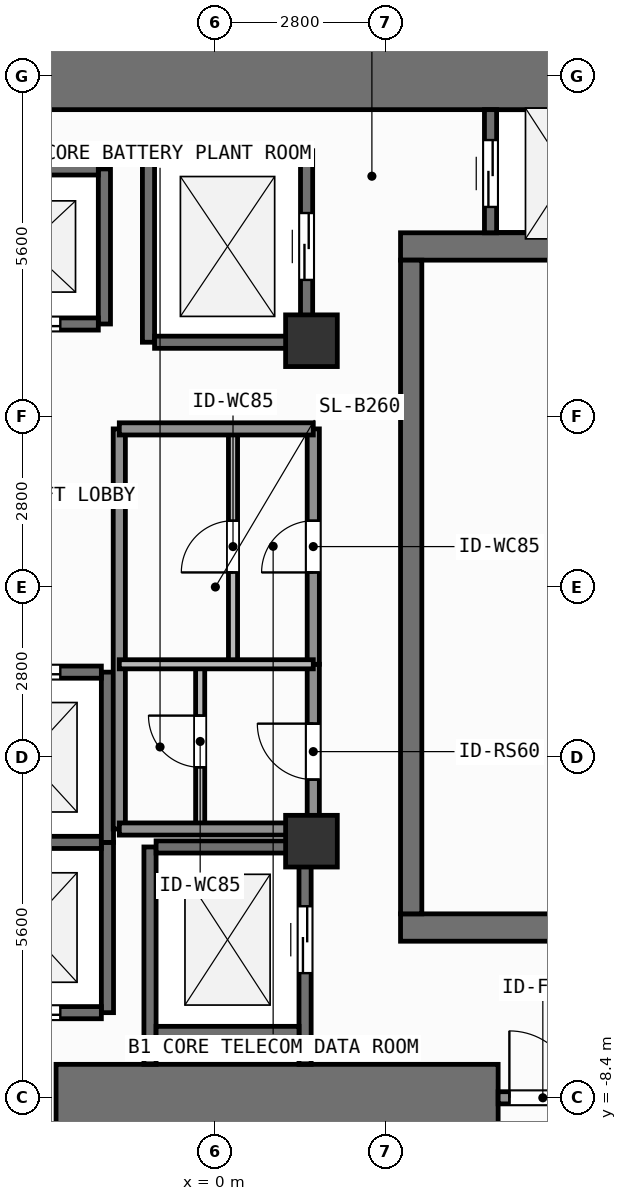
"""IFC4 building model, lengths in metres.
Left out: names, types, materials, properties, quantities, classifications, styles, units other than length and angle.
Written with IfcOpenShell. Run it as: python <this file> out.ifc"""

import sys

from ifc_helpers import new_model, si_unit, direction, frame, frame_2d, origin, origin_2d, place, context, subcontext, project, spatial, rectangle, extrude, element, fill, save


model = new_model("IFC4")
c1 = context("Model", 3, precision=1e-05, world=origin(), true_north=direction((0.0, 1.0)))
c2 = subcontext(c1, "Body", "Model", "MODEL_VIEW")
j1 = project(units=[si_unit("LENGTHUNIT", "METRE"), si_unit("PLANEANGLEUNIT", "RADIAN")], contexts=[c1])
p1 = place(None, origin())
s1 = spatial("IfcSite", under=j1, at=p1, CompositionType="ELEMENT")
p2 = place(p1, origin())
s2 = spatial("IfcBuilding", under=s1, at=p2, CompositionType="ELEMENT")
p3 = place(p2, frame((0.0, 0.0, -4.2)))
s3 = spatial("IfcBuildingStorey", under=s2, at=p3, CompositionType="ELEMENT", Elevation=-4.2)
p4 = place(p3, frame((-2.62, -8.4, 0.0), z_axis=(0.0, 0.0, 1.0), x_axis=(1.0, 0.0, 0.0)))
e1 = element("IfcWall", 1, at=p4, inside=s3, PredefinedType="SHEAR", context=c2, shape_type="SweptSolid", body=[
    extrude(rectangle(XDim=7.27, YDim=1.1, at=frame_2d((3.635, 0.0))), origin(), (0.0, 0.0, 1.0), 4.2),
])
p5 = place(p3, frame((-7.55, 8.4, 0.0), z_axis=(0.0, 0.0, 1.0), x_axis=(1.0, 0.0, 0.0)))
e2 = element("IfcWall", 2, at=p5, inside=s3, PredefinedType="SHEAR", context=c2, shape_type="SweptSolid", body=[
    extrude(rectangle(XDim=16.5, YDim=1.1, at=frame_2d((8.25, 0.0))), origin(), (0.0, 0.0, 1.0), 4.2),
])
for number, where, z_axis, x_axis in (
    (3, (3.045, -5.6, 0.0), (0.0, 0.0, 1.0), (1.0, 0.0, 0.0)),
    (4, (3.045, 5.6, 0.0), (0.0, 0.0, 1.0), (1.0, 0.0, 0.0)),
):
    element("IfcWall", number, at=place(p3, frame(where, z_axis=z_axis, x_axis=x_axis)), inside=s3, PredefinedType="SHEAR", context=c2, shape_type="SweptSolid", body=[
        extrude(rectangle(XDim=5.905, YDim=0.45, at=frame_2d((2.953, 0.0))), origin(), (0.0, 0.0, 1.0), 4.2),
    ])
p6 = place(p3, frame((3.22, -5.375, 0.0), z_axis=(0.0, 0.0, 1.0), x_axis=(0.0, 1.0, 0.0)))
e5 = element("IfcWall", 5, at=p6, inside=s3, PredefinedType="SHEAR", context=c2, shape_type="SweptSolid", body=[
    extrude(rectangle(XDim=10.75, YDim=0.35, at=frame_2d((5.375, 0.0))), origin(), (0.0, 0.0, 1.0), 4.2),
])
for number, where, z_axis, x_axis in (
    (6, (1.58, -4.18, 0.0), (0.0, 0.0, 1.0), (1.0, 0.0, 0.0)),
    (7, (1.58, 4.05, 0.0), (0.0, 0.0, 1.0), (1.0, 0.0, 0.0)),
):
    element("IfcColumn", number, at=place(p3, frame(where, z_axis=z_axis, x_axis=x_axis)), inside=s3, PredefinedType="COLUMN", context=c2, shape_type="SweptSolid", body=[
        extrude(rectangle(XDim=0.85, YDim=0.85, at=origin_2d()), origin(), (0.0, 0.0, 1.0), 4.2),
    ])
p7 = place(p3, frame((-1.825, 4.325, 0.0), z_axis=(0.0, 0.0, 1.0), x_axis=(0.0, 1.0, 0.0)))
e8 = element("IfcWall", 8, at=p7, inside=s3, PredefinedType="SHEAR", context=c2, shape_type="SweptSolid", body=[
    extrude(rectangle(XDim=2.55, YDim=0.2, at=frame_2d((1.275, 0.0))), origin(), (0.0, 0.0, 1.0), 3.9),
])
p8 = place(p3, frame((-4.275, 4.325, 0.0), z_axis=(0.0, 0.0, 1.0), x_axis=(1.0, 0.0, 0.0)))
e9 = element("IfcWall", 9, at=p8, inside=s3, PredefinedType="SHEAR", context=c2, shape_type="SweptSolid", body=[
    extrude(rectangle(XDim=2.35, YDim=0.2, at=frame_2d((1.175, 0.0))), origin(), (0.0, 0.0, 1.0), 3.9),
])
p9 = place(p8, frame((0.625, 0.0, 0.0)))
e10 = element("IfcOpeningElement", 10, at=p9, cuts=e9, PredefinedType="OPENING", context=c2, shape_type="SweptSolid", body=[
    extrude(rectangle(XDim=1.1, YDim=2.2, at=frame_2d((0.55, 1.1))), frame((0.0, 0.11, 0.0), z_axis=(0.0, -1.0, 0.0), x_axis=(1.0, 0.0, 0.0)), (0.0, 0.0, 1.0), 0.22),
])
p10 = place(p3, frame((-4.275, 6.875, 0.0), z_axis=(0.0, 0.0, 1.0), x_axis=(1.0, 0.0, 0.0)))
e11 = element("IfcWall", 11, at=p10, inside=s3, PredefinedType="SHEAR", context=c2, shape_type="SweptSolid", body=[
    extrude(rectangle(XDim=2.35, YDim=0.2, at=frame_2d((1.175, 0.0))), origin(), (0.0, 0.0, 1.0), 3.9),
])
p11 = place(p3, frame((-1.775, -7.0, 0.0), z_axis=(0.0, 0.0, 1.0), x_axis=(0.0, 1.0, 0.0)))
e12 = element("IfcWall", 12, at=p11, inside=s3, PredefinedType="SHEAR", context=c2, shape_type="SweptSolid", body=[
    extrude(rectangle(XDim=2.8, YDim=0.2, at=frame_2d((1.4, 0.0))), origin(), (0.0, 0.0, 1.0), 3.9),
])
p12 = place(p3, frame((-4.325, -7.0, 0.0), z_axis=(0.0, 0.0, 1.0), x_axis=(1.0, 0.0, 0.0)))
e13 = element("IfcWall", 13, at=p12, inside=s3, PredefinedType="SHEAR", context=c2, shape_type="SweptSolid", body=[
    extrude(rectangle(XDim=2.45, YDim=0.2, at=frame_2d((1.225, 0.0))), origin(), (0.0, 0.0, 1.0), 3.9),
])
p13 = place(p12, frame((0.675, 0.0, 0.0)))
e14 = element("IfcOpeningElement", 14, at=p13, cuts=e13, PredefinedType="OPENING", context=c2, shape_type="SweptSolid", body=[
    extrude(rectangle(XDim=1.1, YDim=2.2, at=frame_2d((0.55, 1.1))), frame((0.0, 0.11, 0.0), z_axis=(0.0, -1.0, 0.0), x_axis=(1.0, 0.0, 0.0)), (0.0, 0.0, 1.0), 0.22),
])
p14 = place(p3, frame((-4.325, -4.2, 0.0), z_axis=(0.0, 0.0, 1.0), x_axis=(1.0, 0.0, 0.0)))
e15 = element("IfcWall", 15, at=p14, inside=s3, PredefinedType="SHEAR", context=c2, shape_type="SweptSolid", body=[
    extrude(rectangle(XDim=2.45, YDim=0.2, at=frame_2d((1.225, 0.0))), origin(), (0.0, 0.0, 1.0), 3.9),
])
p15 = place(p3, frame((-1.775, -4.2, 0.0), z_axis=(0.0, 0.0, 1.0), x_axis=(0.0, 1.0, 0.0)))
e16 = element("IfcWall", 16, at=p15, inside=s3, PredefinedType="SHEAR", context=c2, shape_type="SweptSolid", body=[
    extrude(rectangle(XDim=2.8, YDim=0.2, at=frame_2d((1.4, 0.0))), origin(), (0.0, 0.0, 1.0), 3.9),
])
p16 = place(p3, frame((-4.325, -1.4, 0.0), z_axis=(0.0, 0.0, 1.0), x_axis=(1.0, 0.0, 0.0)))
e17 = element("IfcWall", 17, at=p16, inside=s3, PredefinedType="SHEAR", context=c2, shape_type="SweptSolid", body=[
    extrude(rectangle(XDim=2.45, YDim=0.2, at=frame_2d((1.225, 0.0))), origin(), (0.0, 0.0, 1.0), 3.9),
])
p17 = place(p16, frame((0.675, 0.0, 0.0)))
e18 = element("IfcOpeningElement", 18, at=p17, cuts=e17, PredefinedType="OPENING", context=c2, shape_type="SweptSolid", body=[
    extrude(rectangle(XDim=1.1, YDim=2.2, at=frame_2d((0.55, 1.1))), frame((0.0, 0.11, 0.0), z_axis=(0.0, -1.0, 0.0), x_axis=(1.0, 0.0, 0.0)), (0.0, 0.0, 1.0), 0.22),
])
p18 = place(p3, frame((-1.1, 4.025, 0.0), z_axis=(0.0, 0.0, 1.0), x_axis=(0.0, 1.0, 0.0)))
e19 = element("IfcWall", 19, at=p18, inside=s3, PredefinedType="SHEAR", context=c2, shape_type="SweptSolid", body=[
    extrude(rectangle(XDim=3.15, YDim=0.2, at=frame_2d((1.575, 0.0))), origin(), (0.0, 0.0, 1.0), 3.9),
])
p19 = place(p3, frame((1.5, 4.025, 0.0), z_axis=(0.0, 0.0, 1.0), x_axis=(0.0, 1.0, 0.0)))
e20 = element("IfcWall", 20, at=p19, inside=s3, PredefinedType="SHEAR", context=c2, shape_type="SweptSolid", body=[
    extrude(rectangle(XDim=3.15, YDim=0.2, at=frame_2d((1.575, 0.0))), origin(), (0.0, 0.0, 1.0), 3.9),
])
p20 = place(p19, frame((1.025, 0.0, 0.0)))
e21 = element("IfcOpeningElement", 21, at=p20, cuts=e20, PredefinedType="OPENING", context=c2, shape_type="SweptSolid", body=[
    extrude(rectangle(XDim=1.1, YDim=2.2, at=frame_2d((0.55, 1.1))), frame((0.0, 0.11, 0.0), z_axis=(0.0, -1.0, 0.0), x_axis=(1.0, 0.0, 0.0)), (0.0, 0.0, 1.0), 0.22),
])
for number, where, z_axis, x_axis in (
    (22, (-1.0, 4.025, 0.0), (0.0, 0.0, 1.0), (1.0, 0.0, 0.0)),
    (23, (-1.0, 7.175, 0.0), (0.0, 0.0, 1.0), (1.0, 0.0, 0.0)),
):
    element("IfcWall", number, at=place(p3, frame(where, z_axis=z_axis, x_axis=x_axis)), inside=s3, PredefinedType="SHEAR", context=c2, shape_type="SweptSolid", body=[
        extrude(rectangle(XDim=2.4, YDim=0.2, at=frame_2d((1.2, 0.0))), origin(), (0.0, 0.0, 1.0), 3.9),
    ])
p21 = place(p3, frame((-1.075, -7.85, 0.0), z_axis=(0.0, 0.0, 1.0), x_axis=(0.0, 1.0, 0.0)))
e24 = element("IfcWall", 24, at=p21, inside=s3, PredefinedType="SHEAR", context=c2, shape_type="SweptSolid", body=[
    extrude(rectangle(XDim=3.575, YDim=0.2, at=frame_2d((1.788, 0.0))), origin(), (0.0, 0.0, 1.0), 3.9),
])
p22 = place(p3, frame((1.475, -7.85, 0.0), z_axis=(0.0, 0.0, 1.0), x_axis=(0.0, 1.0, 0.0)))
e25 = element("IfcWall", 25, at=p22, inside=s3, PredefinedType="SHEAR", context=c2, shape_type="SweptSolid", body=[
    extrude(rectangle(XDim=3.575, YDim=0.2, at=frame_2d((1.788, 0.0))), origin(), (0.0, 0.0, 1.0), 3.9),
])
p23 = place(p22, frame((1.5, 0.0, 0.0)))
e26 = element("IfcOpeningElement", 26, at=p23, cuts=e25, PredefinedType="OPENING", context=c2, shape_type="SweptSolid", body=[
    extrude(rectangle(XDim=1.1, YDim=2.2, at=frame_2d((0.55, 1.1))), frame((0.0, 0.11, 0.0), z_axis=(0.0, -1.0, 0.0), x_axis=(1.0, 0.0, 0.0)), (0.0, 0.0, 1.0), 0.22),
])
for number, where, z_axis, x_axis in (
    (27, (-0.975, -7.325, 0.0), (0.0, 0.0, 1.0), (1.0, 0.0, 0.0)),
    (28, (-0.975, -4.275, 0.0), (0.0, 0.0, 1.0), (1.0, 0.0, 0.0)),
):
    element("IfcWall", number, at=place(p3, frame(where, z_axis=z_axis, x_axis=x_axis)), inside=s3, PredefinedType="SHEAR", context=c2, shape_type="SweptSolid", body=[
        extrude(rectangle(XDim=2.35, YDim=0.2, at=frame_2d((1.175, 0.0))), origin(), (0.0, 0.0, 1.0), 3.9),
    ])
p24 = place(p3, frame((4.525, 5.825, 0.0), z_axis=(0.0, 0.0, 1.0), x_axis=(0.0, 1.0, 0.0)))
e29 = element("IfcWall", 29, at=p24, inside=s3, PredefinedType="SHEAR", context=c2, shape_type="SweptSolid", body=[
    extrude(rectangle(XDim=2.025, YDim=0.2, at=frame_2d((1.013, 0.0))), origin(), (0.0, 0.0, 1.0), 3.9),
])
p25 = place(p24, frame((0.425, 0.0, 0.0)))
e30 = element("IfcOpeningElement", 30, at=p25, cuts=e29, PredefinedType="OPENING", context=c2, shape_type="SweptSolid", body=[
    extrude(rectangle(XDim=1.1, YDim=2.2, at=frame_2d((0.55, 1.1))), frame((0.0, 0.11, 0.0), z_axis=(0.0, -1.0, 0.0), x_axis=(1.0, 0.0, 0.0)), (0.0, 0.0, 1.0), 0.22),
])
p26 = place(p3, frame((4.65, -8.4, 0.0), z_axis=(0.0, 0.0, 1.0), x_axis=(1.0, 0.0, 0.0)))
e31 = element("IfcWall", 31, at=p26, inside=s3, PredefinedType="SOLIDWALL", context=c2, shape_type="SweptSolid", body=[
    extrude(rectangle(XDim=1.47, YDim=0.2, at=frame_2d((0.735, 0.0))), origin(), (0.0, 0.0, 1.0), 2.94),
])
p27 = place(p26, frame((0.185, 0.0, 0.0)))
e32 = element("IfcOpeningElement", 32, at=p27, cuts=e31, PredefinedType="OPENING", context=c2, shape_type="SweptSolid", body=[
    extrude(rectangle(XDim=1.1, YDim=2.15, at=frame_2d((0.55, 1.075))), frame((0.0, 0.11, 0.0), z_axis=(0.0, -1.0, 0.0), x_axis=(1.0, 0.0, 0.0)), (0.0, 0.0, 1.0), 0.22),
])
p28 = place(p3, frame((-0.25, -3.98, 0.0), z_axis=(0.0, 0.0, 1.0), x_axis=(0.0, 1.0, 0.0)))
e33 = element("IfcWall", 33, at=p28, inside=s3, PredefinedType="PARTITIONING", context=c2, shape_type="SweptSolid", body=[
    extrude(rectangle(XDim=2.709, YDim=0.15, at=frame_2d((1.354, 0.0))), origin(), (0.0, 0.0, 1.0), 3.9),
])
p29 = place(p28, frame((1.015, 0.0, 0.0)))
e34 = element("IfcOpeningElement", 34, at=p29, cuts=e33, PredefinedType="OPENING", context=c2, shape_type="SweptSolid", body=[
    extrude(rectangle(XDim=0.85, YDim=2.1, at=frame_2d((0.425, 1.05))), frame((0.0, 0.085, 0.0), z_axis=(0.0, -1.0, 0.0), x_axis=(1.0, 0.0, 0.0)), (0.0, 0.0, 1.0), 0.17),
])
p30 = place(p3, frame((0.29, -1.271, 0.0), z_axis=(0.0, 0.0, 1.0), x_axis=(0.0, 1.0, 0.0)))
e35 = element("IfcWall", 35, at=p30, inside=s3, PredefinedType="PARTITIONING", context=c2, shape_type="SweptSolid", body=[
    extrude(rectangle(XDim=3.871, YDim=0.15, at=frame_2d((1.936, 0.0))), origin(), (0.0, 0.0, 1.0), 3.9),
])
p31 = place(p30, frame((1.51, 0.0, 0.0)))
e36 = element("IfcOpeningElement", 36, at=p31, cuts=e35, PredefinedType="OPENING", context=c2, shape_type="SweptSolid", body=[
    extrude(rectangle(XDim=0.85, YDim=2.1, at=frame_2d((0.425, 1.05))), frame((0.0, 0.085, 0.0), z_axis=(0.0, -1.0, 0.0), x_axis=(1.0, 0.0, 0.0)), (0.0, 0.0, 1.0), 0.17),
])
p32 = place(p3, frame((1.61, -3.98, 0.0), z_axis=(0.0, 0.0, 1.0), x_axis=(0.0, 1.0, 0.0)))
e37 = element("IfcWall", 37, at=p32, inside=s3, PredefinedType="SOLIDWALL", context=c2, shape_type="SweptSolid", body=[
    extrude(rectangle(XDim=2.709, YDim=0.2, at=frame_2d((1.354, 0.0))), origin(), (0.0, 0.0, 1.0), 3.9),
])
p33 = place(p32, frame((0.813, 0.0, 0.0)))
e38 = element("IfcOpeningElement", 38, at=p33, cuts=e37, PredefinedType="OPENING", context=c2, shape_type="SweptSolid", body=[
    extrude(rectangle(XDim=0.92, YDim=2.1, at=frame_2d((0.46, 1.05))), frame((0.0, 0.11, 0.0), z_axis=(0.0, -1.0, 0.0), x_axis=(1.0, 0.0, 0.0)), (0.0, 0.0, 1.0), 0.22),
])
p34 = place(p3, frame((1.61, -1.271, 0.0), z_axis=(0.0, 0.0, 1.0), x_axis=(0.0, 1.0, 0.0)))
e39 = element("IfcWall", 39, at=p34, inside=s3, PredefinedType="SOLIDWALL", context=c2, shape_type="SweptSolid", body=[
    extrude(rectangle(XDim=3.871, YDim=0.2, at=frame_2d((1.936, 0.0))), origin(), (0.0, 0.0, 1.0), 3.9),
])
p35 = place(p34, frame((1.51, 0.0, 0.0)))
e40 = element("IfcOpeningElement", 40, at=p35, cuts=e39, PredefinedType="OPENING", context=c2, shape_type="SweptSolid", body=[
    extrude(rectangle(XDim=0.85, YDim=2.1, at=frame_2d((0.425, 1.05))), frame((0.0, 0.11, 0.0), z_axis=(0.0, -1.0, 0.0), x_axis=(1.0, 0.0, 0.0)), (0.0, 0.0, 1.0), 0.22),
])
p36 = place(p3, frame((-1.58, -3.98, 0.0), z_axis=(0.0, 0.0, 1.0), x_axis=(0.0, 1.0, 0.0)))
e41 = element("IfcWall", 41, at=p36, inside=s3, PredefinedType="SOLIDWALL", context=c2, shape_type="SweptSolid", body=[
    extrude(rectangle(XDim=6.58, YDim=0.2, at=frame_2d((3.29, 0.0))), origin(), (0.0, 0.0, 1.0), 3.9),
])
for number, where, z_axis, x_axis in (
    (42, (-1.58, -3.98, 0.0), (0.0, 0.0, 1.0), (1.0, 0.0, 0.0)),
    (43, (-1.58, 2.6, 0.0), (0.0, 0.0, 1.0), (1.0, 0.0, 0.0)),
):
    element("IfcWall", number, at=place(p3, frame(where, z_axis=z_axis, x_axis=x_axis)), inside=s3, PredefinedType="SOLIDWALL", context=c2, shape_type="SweptSolid", body=[
        extrude(rectangle(XDim=3.19, YDim=0.2, at=frame_2d((1.595, 0.0))), origin(), (0.0, 0.0, 1.0), 3.9),
    ])
p37 = place(p3, frame((-1.58, -1.271, 0.0), z_axis=(0.0, 0.0, 1.0), x_axis=(1.0, 0.0, 0.0)))
e44 = element("IfcWall", 44, at=p37, inside=s3, PredefinedType="PARTITIONING", context=c2, shape_type="SweptSolid", body=[
    extrude(rectangle(XDim=3.19, YDim=0.15, at=frame_2d((1.595, 0.0))), origin(), (0.0, 0.0, 1.0), 3.9),
])
p38 = place(p9, origin())
e45 = element("IfcDoor", 45, at=p38, inside=s3, OperationType="SLIDING_TO_LEFT", PredefinedType="DOOR", context=c2, shape_type="SweptSolid", body=[
    extrude(rectangle(XDim=1.1, YDim=2.2, at=frame_2d((0.55, 1.1))), frame((0.0, 0.025, 0.0), z_axis=(0.0, -1.0, 0.0), x_axis=(1.0, 0.0, 0.0)), (0.0, 0.0, 1.0), 0.05),
])
fill(e10, e45)
p39 = place(p13, origin())
e46 = element("IfcDoor", 46, at=p39, inside=s3, OperationType="SLIDING_TO_LEFT", PredefinedType="DOOR", context=c2, shape_type="SweptSolid", body=[
    extrude(rectangle(XDim=1.1, YDim=2.2, at=frame_2d((0.55, 1.1))), frame((0.0, 0.025, 0.0), z_axis=(0.0, -1.0, 0.0), x_axis=(1.0, 0.0, 0.0)), (0.0, 0.0, 1.0), 0.05),
])
fill(e14, e46)
p40 = place(p17, origin())
e47 = element("IfcDoor", 47, at=p40, inside=s3, OperationType="SLIDING_TO_LEFT", PredefinedType="DOOR", context=c2, shape_type="SweptSolid", body=[
    extrude(rectangle(XDim=1.1, YDim=2.2, at=frame_2d((0.55, 1.1))), frame((0.0, 0.025, 0.0), z_axis=(0.0, -1.0, 0.0), x_axis=(1.0, 0.0, 0.0)), (0.0, 0.0, 1.0), 0.05),
])
fill(e18, e47)
p41 = place(p20, origin())
e48 = element("IfcDoor", 48, at=p41, inside=s3, OperationType="SLIDING_TO_LEFT", PredefinedType="DOOR", context=c2, shape_type="SweptSolid", body=[
    extrude(rectangle(XDim=1.1, YDim=2.2, at=frame_2d((0.55, 1.1))), frame((0.0, 0.025, 0.0), z_axis=(0.0, -1.0, 0.0), x_axis=(1.0, 0.0, 0.0)), (0.0, 0.0, 1.0), 0.05),
])
fill(e21, e48)
p42 = place(p23, origin())
e49 = element("IfcDoor", 49, at=p42, inside=s3, OperationType="SLIDING_TO_LEFT", PredefinedType="DOOR", context=c2, shape_type="SweptSolid", body=[
    extrude(rectangle(XDim=1.1, YDim=2.2, at=frame_2d((0.55, 1.1))), frame((0.0, 0.025, 0.0), z_axis=(0.0, -1.0, 0.0), x_axis=(1.0, 0.0, 0.0)), (0.0, 0.0, 1.0), 0.05),
])
fill(e26, e49)
p43 = place(p25, origin())
e50 = element("IfcDoor", 50, at=p43, inside=s3, OperationType="SLIDING_TO_LEFT", PredefinedType="DOOR", context=c2, shape_type="SweptSolid", body=[
    extrude(rectangle(XDim=1.1, YDim=2.2, at=frame_2d((0.55, 1.1))), frame((0.0, 0.025, 0.0), z_axis=(0.0, -1.0, 0.0), x_axis=(1.0, 0.0, 0.0)), (0.0, 0.0, 1.0), 0.05),
])
fill(e30, e50)
p44 = place(p27, origin())
e51 = element("IfcDoor", 51, at=p44, inside=s3, OperationType="SINGLE_SWING_LEFT", PredefinedType="DOOR", context=c2, shape_type="SweptSolid", body=[
    extrude(rectangle(XDim=1.1, YDim=2.15, at=frame_2d((0.55, 1.075))), frame((0.0, 0.025, 0.0), z_axis=(0.0, -1.0, 0.0), x_axis=(1.0, 0.0, 0.0)), (0.0, 0.0, 1.0), 0.05),
])
fill(e32, e51)
p45 = place(p29, origin())
e52 = element("IfcDoor", 52, at=p45, inside=s3, OperationType="SINGLE_SWING_RIGHT", PredefinedType="DOOR", context=c2, shape_type="SweptSolid", body=[
    extrude(rectangle(XDim=0.85, YDim=2.1, at=frame_2d((0.425, 1.05))), frame((0.0, 0.025, 0.0), z_axis=(0.0, -1.0, 0.0), x_axis=(1.0, 0.0, 0.0)), (0.0, 0.0, 1.0), 0.05),
])
fill(e34, e52)
p46 = place(p31, origin())
e53 = element("IfcDoor", 53, at=p46, inside=s3, OperationType="SINGLE_SWING_LEFT", PredefinedType="DOOR", context=c2, shape_type="SweptSolid", body=[
    extrude(rectangle(XDim=0.85, YDim=2.1, at=frame_2d((0.425, 1.05))), frame((0.0, 0.025, 0.0), z_axis=(0.0, -1.0, 0.0), x_axis=(1.0, 0.0, 0.0)), (0.0, 0.0, 1.0), 0.05),
])
fill(e36, e53)
p47 = place(p33, origin())
e54 = element("IfcDoor", 54, at=p47, inside=s3, OperationType="SINGLE_SWING_RIGHT", PredefinedType="DOOR", context=c2, shape_type="SweptSolid", body=[
    extrude(rectangle(XDim=0.92, YDim=2.1, at=frame_2d((0.46, 1.05))), frame((0.0, 0.025, 0.0), z_axis=(0.0, -1.0, 0.0), x_axis=(1.0, 0.0, 0.0)), (0.0, 0.0, 1.0), 0.05),
])
fill(e38, e54)
p48 = place(p35, origin())
e55 = element("IfcDoor", 55, at=p48, inside=s3, OperationType="SINGLE_SWING_LEFT", PredefinedType="DOOR", context=c2, shape_type="SweptSolid", body=[
    extrude(rectangle(XDim=0.85, YDim=2.1, at=frame_2d((0.425, 1.05))), frame((0.0, 0.025, 0.0), z_axis=(0.0, -1.0, 0.0), x_axis=(1.0, 0.0, 0.0)), (0.0, 0.0, 1.0), 0.05),
])
fill(e40, e55)
save(model, sys.argv[1])
